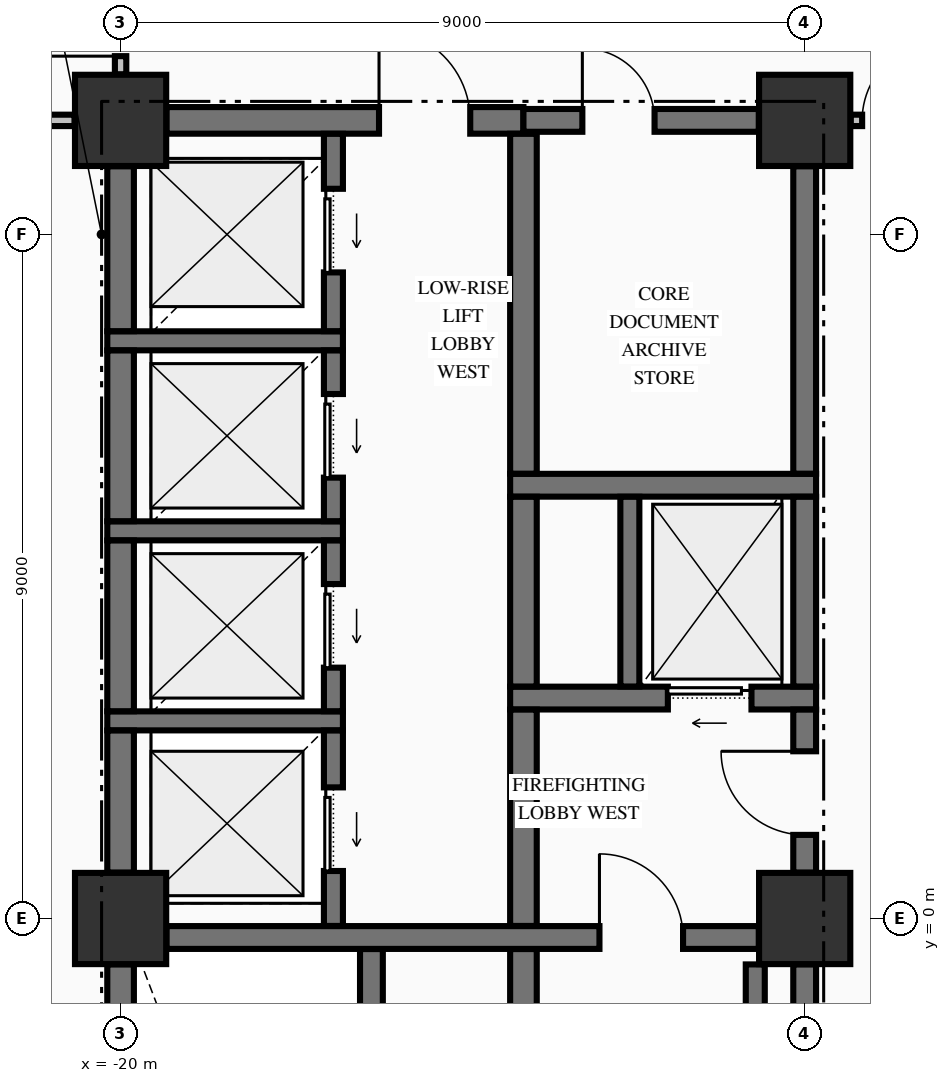
"""IFC4 building model, lengths in metres.
Left out: names, types, materials, properties, quantities, classifications, styles, units other than length and angle.
Written with IfcOpenShell. Run it as: python <this file> out.ifc"""

import sys

from ifc_helpers import new_model, si_unit, direction, frame, frame_2d, origin, origin_2d, place, context, subcontext, project, spatial, rectangle, extrude, element, fill, save


model = new_model("IFC4")
c1 = context("Model", 3, precision=1e-05, world=origin(), true_north=direction((0.0, 1.0)))
c2 = subcontext(c1, "Body", "Model", "MODEL_VIEW")
j1 = project(units=[si_unit("LENGTHUNIT", "METRE"), si_unit("PLANEANGLEUNIT", "RADIAN")], contexts=[c1])
p1 = place(None, origin())
s1 = spatial("IfcSite", under=j1, at=p1, CompositionType="ELEMENT")
p2 = place(p1, origin())
s2 = spatial("IfcBuilding", under=s1, at=p2, CompositionType="ELEMENT")
p3 = place(p2, frame((0.0, 0.0, 52.19)))
s3 = spatial("IfcBuildingStorey", under=s2, at=p3, CompositionType="ELEMENT", Elevation=52.19)
for number, where, z_axis, x_axis in (
    (1, (-20.0, 10.5, -0.425), (0.0, 0.0, 1.0), (1.0, 0.0, 0.0)),
    (2, (-11.0, 0.0, -0.425), (0.0, 0.0, 1.0), (1.0, 0.0, 0.0)),
    (3, (-11.0, 10.5, -0.425), (0.0, 0.0, 1.0), (1.0, 0.0, 0.0)),
    (4, (-20.0, 0.0, -0.425), (0.0, 0.0, 1.0), (1.0, 0.0, 0.0)),
):
    element("IfcColumn", number, at=place(p3, frame(where, z_axis=z_axis, x_axis=x_axis)), inside=s3, PredefinedType="COLUMN", context=c2, shape_type="SweptSolid", body=[
        extrude(rectangle(XDim=1.2, YDim=1.2, at=origin_2d()), origin(), (0.0, 0.0, 1.0), 5.0),
    ])
p4 = place(p3, frame((-19.396, -0.25, 0.0), z_axis=(0.0, 0.0, 1.0), x_axis=(1.0, 0.0, 0.0)))
e5 = element("IfcWall", 5, at=p4, inside=s3, PredefinedType="SHEAR", context=c2, shape_type="SweptSolid", body=[
    extrude(rectangle(XDim=7.792, YDim=0.3, at=frame_2d((3.896, 0.0))), origin(), (0.0, 0.0, 1.0), 4.575),
])
p5 = place(p4, frame((5.696, 0.0, 0.0)))
e6 = element("IfcOpeningElement", 6, at=p5, cuts=e5, PredefinedType="OPENING", context=c2, shape_type="SweptSolid", body=[
    extrude(rectangle(XDim=1.1, YDim=2.15, at=frame_2d((0.55, 1.075))), frame((0.0, 0.16, 0.0), z_axis=(0.0, -1.0, 0.0), x_axis=(1.0, 0.0, 0.0)), (0.0, 0.0, 1.0), 0.32),
])
p6 = place(p3, frame((-20.175, 2.6, 0.0), z_axis=(0.0, 0.0, 1.0), x_axis=(1.0, 0.0, 0.0)))
e7 = element("IfcWall", 7, at=p6, inside=s3, PredefinedType="SOLIDWALL", context=c2, shape_type="SweptSolid", body=[
    extrude(rectangle(XDim=3.1, YDim=0.25, at=frame_2d((1.55, 0.0))), origin(), (0.0, 0.0, 1.0), 4.575),
])
p7 = place(p3, frame((-14.875, 2.9, 0.0), z_axis=(0.0, 0.0, 1.0), x_axis=(1.0, 0.0, 0.0)))
e8 = element("IfcWall", 8, at=p7, inside=s3, PredefinedType="SHEAR", context=c2, shape_type="SweptSolid", body=[
    extrude(rectangle(XDim=4.025, YDim=0.3, at=frame_2d((2.012, 0.0))), origin(), (0.0, 0.0, 1.0), 4.575),
])
p8 = place(p7, frame((2.075, 0.0, 0.0)))
e9 = element("IfcOpeningElement", 9, at=p8, cuts=e8, PredefinedType="OPENING", context=c2, shape_type="SweptSolid", body=[
    extrude(rectangle(XDim=1.1, YDim=2.2, at=frame_2d((0.55, 1.1))), frame((0.0, 0.16, 0.0), z_axis=(0.0, -1.0, 0.0), x_axis=(1.0, 0.0, 0.0)), (0.0, 0.0, 1.0), 0.32),
])
p9 = place(p3, frame((-20.175, 5.1, 0.0), z_axis=(0.0, 0.0, 1.0), x_axis=(1.0, 0.0, 0.0)))
e10 = element("IfcWall", 10, at=p9, inside=s3, PredefinedType="SOLIDWALL", context=c2, shape_type="SweptSolid", body=[
    extrude(rectangle(XDim=3.1, YDim=0.25, at=frame_2d((1.55, 0.0))), origin(), (0.0, 0.0, 1.0), 4.575),
])
p10 = place(p3, frame((-14.875, 5.7, 0.0), z_axis=(0.0, 0.0, 1.0), x_axis=(1.0, 0.0, 0.0)))
e11 = element("IfcWall", 11, at=p10, inside=s3, PredefinedType="SHEAR", context=c2, shape_type="SweptSolid", body=[
    extrude(rectangle(XDim=4.025, YDim=0.3, at=frame_2d((2.012, 0.0))), origin(), (0.0, 0.0, 1.0), 4.575),
])
p11 = place(p3, frame((-20.175, 7.6, 0.0), z_axis=(0.0, 0.0, 1.0), x_axis=(1.0, 0.0, 0.0)))
e12 = element("IfcWall", 12, at=p11, inside=s3, PredefinedType="SOLIDWALL", context=c2, shape_type="SweptSolid", body=[
    extrude(rectangle(XDim=3.1, YDim=0.25, at=frame_2d((1.55, 0.0))), origin(), (0.0, 0.0, 1.0), 4.575),
])
p12 = place(p3, frame((-19.396, 10.5, 0.0), z_axis=(0.0, 0.0, 1.0), x_axis=(1.0, 0.0, 0.0)))
e13 = element("IfcWall", 13, at=p12, inside=s3, PredefinedType="SHEAR", context=c2, shape_type="SweptSolid", body=[
    extrude(rectangle(XDim=4.696, YDim=0.35, at=frame_2d((2.348, 0.0))), origin(), (0.0, 0.0, 1.0), 4.575),
])
p13 = place(p12, frame((2.796, 0.0, 0.0)))
e14 = element("IfcOpeningElement", 14, at=p13, cuts=e13, PredefinedType="OPENING", context=c2, shape_type="SweptSolid", body=[
    extrude(rectangle(XDim=1.2, YDim=2.15, at=frame_2d((0.6, 1.075))), frame((0.0, 0.185, 0.0), z_axis=(0.0, -1.0, 0.0), x_axis=(1.0, 0.0, 0.0)), (0.0, 0.0, 1.0), 0.37),
])
p14 = place(p3, frame((-14.7, 10.5, 0.0), z_axis=(0.0, 0.0, 1.0), x_axis=(1.0, 0.0, 0.0)))
e15 = element("IfcWall", 15, at=p14, inside=s3, PredefinedType="SHEAR", context=c2, shape_type="SweptSolid", body=[
    extrude(rectangle(XDim=3.096, YDim=0.3, at=frame_2d((1.548, 0.0))), origin(), (0.0, 0.0, 1.0), 4.575),
])
p15 = place(p14, frame((0.775, 0.0, 0.0)))
e16 = element("IfcOpeningElement", 16, at=p15, cuts=e15, PredefinedType="OPENING", context=c2, shape_type="SweptSolid", body=[
    extrude(rectangle(XDim=0.95, YDim=2.15, at=frame_2d((0.475, 1.075))), frame((0.0, 0.16, 0.0), z_axis=(0.0, -1.0, 0.0), x_axis=(1.0, 0.0, 0.0)), (0.0, 0.0, 1.0), 0.32),
])
p16 = place(p3, frame((-23.835, 10.5, 0.0), z_axis=(0.0, 0.0, 1.0), x_axis=(1.0, 0.0, 0.0)))
e17 = element("IfcWall", 17, at=p16, inside=s3, PredefinedType="PARTITIONING", context=c2, shape_type="SweptSolid", body=[
    extrude(rectangle(XDim=3.229, YDim=0.15, at=frame_2d((1.615, 0.0))), origin(), (0.0, 0.0, 1.0), 4.575),
])
p17 = place(p16, frame((1.335, 0.0, 0.0)))
e18 = element("IfcOpeningElement", 18, at=p17, cuts=e17, PredefinedType="OPENING", context=c2, shape_type="SweptSolid", body=[
    extrude(rectangle(XDim=1.0, YDim=2.15, at=frame_2d((0.5, 1.075))), frame((0.0, 0.085, 0.0), z_axis=(0.0, -1.0, 0.0), x_axis=(1.0, 0.0, 0.0)), (0.0, 0.0, 1.0), 0.17),
])
p18 = place(p3, frame((-10.394, 10.5, 0.0), z_axis=(0.0, 0.0, 1.0), x_axis=(1.0, 0.0, 0.0)))
e19 = element("IfcWall", 19, at=p18, inside=s3, PredefinedType="PARTITIONING", context=c2, shape_type="SweptSolid", body=[
    extrude(rectangle(XDim=20.788, YDim=0.15, at=frame_2d((10.394, 0.0))), origin(), (0.0, 0.0, 1.0), 4.575),
])
p19 = place(p18, frame((0.15, 0.0, 0.0)))
e20 = element("IfcOpeningElement", 20, at=p19, cuts=e19, PredefinedType="OPENING", context=c2, shape_type="SweptSolid", body=[
    extrude(rectangle(XDim=1.05, YDim=2.15, at=frame_2d((0.525, 1.075))), frame((0.0, 0.085, 0.0), z_axis=(0.0, -1.0, 0.0), x_axis=(1.0, 0.0, 0.0)), (0.0, 0.0, 1.0), 0.17),
])
p20 = place(p18, frame((19.588, 0.0, 0.0)))
e21 = element("IfcOpeningElement", 21, at=p20, cuts=e19, PredefinedType="OPENING", context=c2, shape_type="SweptSolid", body=[
    extrude(rectangle(XDim=1.05, YDim=2.15, at=frame_2d((0.525, 1.075))), frame((0.0, 0.085, 0.0), z_axis=(0.0, -1.0, 0.0), x_axis=(1.0, 0.0, 0.0)), (0.0, 0.0, 1.0), 0.17),
])
p21 = place(p3, frame((-20.0, -9.346, 0.0), z_axis=(0.0, 0.0, 1.0), x_axis=(0.0, 1.0, 0.0)))
e22 = element("IfcWall", 22, at=p21, inside=s3, PredefinedType="SHEAR", context=c2, shape_type="SweptSolid", body=[
    extrude(rectangle(XDim=8.742, YDim=0.35, at=frame_2d((4.371, 0.0))), origin(), (0.0, 0.0, 1.0), 4.575),
])
p22 = place(p3, frame((-20.0, 0.604, 0.0), z_axis=(0.0, 0.0, 1.0), x_axis=(0.0, 1.0, 0.0)))
e23 = element("IfcWall", 23, at=p22, inside=s3, PredefinedType="SHEAR", context=c2, shape_type="SweptSolid", body=[
    extrude(rectangle(XDim=1.869, YDim=0.35, at=frame_2d((0.935, 0.0))), origin(), (0.0, 0.0, 1.0), 4.575),
])
for number, where, z_axis, x_axis in (
    (24, (-20.0, 2.727, 0.0), (0.0, 0.0, 1.0), (0.0, 1.0, 0.0)),
    (25, (-20.0, 5.227, 0.0), (0.0, 0.0, 1.0), (0.0, 1.0, 0.0)),
):
    element("IfcWall", number, at=place(p3, frame(where, z_axis=z_axis, x_axis=x_axis)), inside=s3, PredefinedType="SHEAR", context=c2, shape_type="SweptSolid", body=[
        extrude(rectangle(XDim=2.246, YDim=0.35, at=frame_2d((1.123, 0.0))), origin(), (0.0, 0.0, 1.0), 4.575),
    ])
p23 = place(p3, frame((-20.0, 7.727, 0.0), z_axis=(0.0, 0.0, 1.0), x_axis=(0.0, 1.0, 0.0)))
e26 = element("IfcWall", 26, at=p23, inside=s3, PredefinedType="SHEAR", context=c2, shape_type="SweptSolid", body=[
    extrude(rectangle(XDim=2.169, YDim=0.35, at=frame_2d((1.084, 0.0))), origin(), (0.0, 0.0, 1.0), 4.575),
])
p24 = place(p3, frame((-17.2, -0.098, 0.0), z_axis=(0.0, 0.0, 1.0), x_axis=(0.0, 1.0, 0.0)))
e27 = element("IfcWall", 27, at=p24, inside=s3, PredefinedType="SOLIDWALL", context=c2, shape_type="SweptSolid", body=[
    extrude(rectangle(XDim=2.571, YDim=0.25, at=frame_2d((1.285, 0.0))), origin(), (0.0, 0.0, 1.0), 4.575),
])
p25 = place(p24, frame((0.723, 0.0, 0.0)))
e28 = element("IfcOpeningElement", 28, at=p25, cuts=e27, PredefinedType="OPENING", context=c2, shape_type="SweptSolid", body=[
    extrude(rectangle(XDim=1.1, YDim=2.2, at=frame_2d((0.55, 1.1))), frame((0.0, 0.135, 0.0), z_axis=(0.0, -1.0, 0.0), x_axis=(1.0, 0.0, 0.0)), (0.0, 0.0, 1.0), 0.27),
])
p26 = place(p3, frame((-17.2, 2.727, 0.0), z_axis=(0.0, 0.0, 1.0), x_axis=(0.0, 1.0, 0.0)))
e29 = element("IfcWall", 29, at=p26, inside=s3, PredefinedType="SOLIDWALL", context=c2, shape_type="SweptSolid", body=[
    extrude(rectangle(XDim=2.246, YDim=0.25, at=frame_2d((1.123, 0.0))), origin(), (0.0, 0.0, 1.0), 4.575),
])
p27 = place(p26, frame((0.573, 0.0, 0.0)))
e30 = element("IfcOpeningElement", 30, at=p27, cuts=e29, PredefinedType="OPENING", context=c2, shape_type="SweptSolid", body=[
    extrude(rectangle(XDim=1.1, YDim=2.2, at=frame_2d((0.55, 1.1))), frame((0.0, 0.135, 0.0), z_axis=(0.0, -1.0, 0.0), x_axis=(1.0, 0.0, 0.0)), (0.0, 0.0, 1.0), 0.27),
])
p28 = place(p3, frame((-17.2, 5.227, 0.0), z_axis=(0.0, 0.0, 1.0), x_axis=(0.0, 1.0, 0.0)))
e31 = element("IfcWall", 31, at=p28, inside=s3, PredefinedType="SOLIDWALL", context=c2, shape_type="SweptSolid", body=[
    extrude(rectangle(XDim=2.246, YDim=0.25, at=frame_2d((1.123, 0.0))), origin(), (0.0, 0.0, 1.0), 4.575),
])
p29 = place(p28, frame((0.573, 0.0, 0.0)))
e32 = element("IfcOpeningElement", 32, at=p29, cuts=e31, PredefinedType="OPENING", context=c2, shape_type="SweptSolid", body=[
    extrude(rectangle(XDim=1.1, YDim=2.2, at=frame_2d((0.55, 1.1))), frame((0.0, 0.135, 0.0), z_axis=(0.0, -1.0, 0.0), x_axis=(1.0, 0.0, 0.0)), (0.0, 0.0, 1.0), 0.27),
])
p30 = place(p3, frame((-17.2, 7.727, 0.0), z_axis=(0.0, 0.0, 1.0), x_axis=(0.0, 1.0, 0.0)))
e33 = element("IfcWall", 33, at=p30, inside=s3, PredefinedType="SOLIDWALL", context=c2, shape_type="SweptSolid", body=[
    extrude(rectangle(XDim=2.596, YDim=0.25, at=frame_2d((1.298, 0.0))), origin(), (0.0, 0.0, 1.0), 4.575),
])
p31 = place(p30, frame((0.773, 0.0, 0.0)))
e34 = element("IfcOpeningElement", 34, at=p31, cuts=e33, PredefinedType="OPENING", context=c2, shape_type="SweptSolid", body=[
    extrude(rectangle(XDim=1.1, YDim=2.2, at=frame_2d((0.55, 1.1))), frame((0.0, 0.135, 0.0), z_axis=(0.0, -1.0, 0.0), x_axis=(1.0, 0.0, 0.0)), (0.0, 0.0, 1.0), 0.27),
])
p32 = place(p3, frame((-16.7, -9.773, 0.0), z_axis=(0.0, 0.0, 1.0), x_axis=(0.0, 1.0, 0.0)))
e35 = element("IfcWall", 35, at=p32, inside=s3, PredefinedType="SHEAR", context=c2, shape_type="SweptSolid", body=[
    extrude(rectangle(XDim=9.371, YDim=0.3, at=frame_2d((4.686, 0.0))), origin(), (0.0, 0.0, 1.0), 4.575),
])
p33 = place(p3, frame((-14.7, -9.773, 0.0), z_axis=(0.0, 0.0, 1.0), x_axis=(0.0, 1.0, 0.0)))
e36 = element("IfcWall", 36, at=p33, inside=s3, PredefinedType="SHEAR", context=c2, shape_type="SweptSolid", body=[
    extrude(rectangle(XDim=9.371, YDim=0.35, at=frame_2d((4.686, 0.0))), origin(), (0.0, 0.0, 1.0), 4.575),
])
p34 = place(p3, frame((-14.7, -0.098, 0.0), z_axis=(0.0, 0.0, 1.0), x_axis=(0.0, 1.0, 0.0)))
e37 = element("IfcWall", 37, at=p34, inside=s3, PredefinedType="SHEAR", context=c2, shape_type="SweptSolid", body=[
    extrude(rectangle(XDim=2.846, YDim=0.35, at=frame_2d((1.423, 0.0))), origin(), (0.0, 0.0, 1.0), 4.575),
])
p35 = place(p3, frame((-14.7, 3.052, 0.0), z_axis=(0.0, 0.0, 1.0), x_axis=(0.0, 1.0, 0.0)))
e38 = element("IfcWall", 38, at=p35, inside=s3, PredefinedType="SHEAR", context=c2, shape_type="SweptSolid", body=[
    extrude(rectangle(XDim=2.496, YDim=0.35, at=frame_2d((1.248, 0.0))), origin(), (0.0, 0.0, 1.0), 4.575),
])
p36 = place(p3, frame((-14.7, 5.852, 0.0), z_axis=(0.0, 0.0, 1.0), x_axis=(0.0, 1.0, 0.0)))
e39 = element("IfcWall", 39, at=p36, inside=s3, PredefinedType="SHEAR", context=c2, shape_type="SweptSolid", body=[
    extrude(rectangle(XDim=4.471, YDim=0.35, at=frame_2d((2.235, 0.0))), origin(), (0.0, 0.0, 1.0), 4.575),
])
p37 = place(p3, frame((-13.3, 3.052, 0.0), z_axis=(0.0, 0.0, 1.0), x_axis=(0.0, 1.0, 0.0)))
e40 = element("IfcWall", 40, at=p37, inside=s3, PredefinedType="SOLIDWALL", context=c2, shape_type="SweptSolid", body=[
    extrude(rectangle(XDim=2.496, YDim=0.25, at=frame_2d((1.248, 0.0))), origin(), (0.0, 0.0, 1.0), 4.575),
])
p38 = place(p3, frame((-11.65, -9.346, 0.0), z_axis=(0.0, 0.0, 1.0), x_axis=(0.0, 1.0, 0.0)))
e41 = element("IfcWall", 41, at=p38, inside=s3, PredefinedType="SOLIDWALL", context=c2, shape_type="SweptSolid", body=[
    extrude(rectangle(XDim=8.742, YDim=0.25, at=frame_2d((4.371, 0.0))), origin(), (0.0, 0.0, 1.0), 4.575),
])
p39 = place(p3, frame((-11.0, -9.346, 0.0), z_axis=(0.0, 0.0, 1.0), x_axis=(0.0, 1.0, 0.0)))
e42 = element("IfcWall", 42, at=p39, inside=s3, PredefinedType="SHEAR", context=c2, shape_type="SweptSolid", body=[
    extrude(rectangle(XDim=8.742, YDim=0.3, at=frame_2d((4.371, 0.0))), origin(), (0.0, 0.0, 1.0), 4.575),
])
p40 = place(p3, frame((-11.0, 0.604, 0.0), z_axis=(0.0, 0.0, 1.0), x_axis=(0.0, 1.0, 0.0)))
e43 = element("IfcWall", 43, at=p40, inside=s3, PredefinedType="SHEAR", context=c2, shape_type="SweptSolid", body=[
    extrude(rectangle(XDim=2.144, YDim=0.3, at=frame_2d((1.072, 0.0))), origin(), (0.0, 0.0, 1.0), 4.575),
])
p41 = place(p40, frame((0.496, 0.0, 0.0)))
e44 = element("IfcOpeningElement", 44, at=p41, cuts=e43, PredefinedType="OPENING", context=c2, shape_type="SweptSolid", body=[
    extrude(rectangle(XDim=1.1, YDim=2.15, at=frame_2d((0.55, 1.075))), frame((0.0, 0.16, 0.0), z_axis=(0.0, -1.0, 0.0), x_axis=(1.0, 0.0, 0.0)), (0.0, 0.0, 1.0), 0.32),
])
p42 = place(p3, frame((-11.0, 3.052, 0.0), z_axis=(0.0, 0.0, 1.0), x_axis=(0.0, 1.0, 0.0)))
e45 = element("IfcWall", 45, at=p42, inside=s3, PredefinedType="SHEAR", context=c2, shape_type="SweptSolid", body=[
    extrude(rectangle(XDim=2.496, YDim=0.3, at=frame_2d((1.248, 0.0))), origin(), (0.0, 0.0, 1.0), 4.575),
])
p43 = place(p3, frame((-11.0, 5.852, 0.0), z_axis=(0.0, 0.0, 1.0), x_axis=(0.0, 1.0, 0.0)))
e46 = element("IfcWall", 46, at=p43, inside=s3, PredefinedType="SHEAR", context=c2, shape_type="SweptSolid", body=[
    extrude(rectangle(XDim=4.044, YDim=0.3, at=frame_2d((2.022, 0.0))), origin(), (0.0, 0.0, 1.0), 4.575),
])
p44 = place(p3, frame((-20.0, 11.106, 0.0), z_axis=(0.0, 0.0, 1.0), x_axis=(0.0, 1.0, 0.0)))
e47 = element("IfcWall", 47, at=p44, inside=s3, PredefinedType="PARTITIONING", context=c2, shape_type="SweptSolid", body=[
    extrude(rectangle(XDim=1.966, YDim=0.15, at=frame_2d((0.983, 0.0))), origin(), (0.0, 0.0, 1.0), 4.575),
])
p45 = place(p44, frame((0.239, 0.0, 0.0)))
e48 = element("IfcOpeningElement", 48, at=p45, cuts=e47, PredefinedType="OPENING", context=c2, shape_type="SweptSolid", body=[
    extrude(rectangle(XDim=0.95, YDim=2.02, at=frame_2d((0.475, 1.01))), frame((0.0, 0.085, 0.0), z_axis=(0.0, -1.0, 0.0), x_axis=(1.0, 0.0, 0.0)), (0.0, 0.0, 1.0), 0.17),
])
p46 = place(p5, origin())
e49 = element("IfcDoor", 49, at=p46, inside=s3, OperationType="SINGLE_SWING_LEFT", PredefinedType="DOOR", context=c2, shape_type="SweptSolid", body=[
    extrude(rectangle(XDim=1.1, YDim=2.15, at=frame_2d((0.55, 1.075))), frame((0.0, 0.025, 0.0), z_axis=(0.0, -1.0, 0.0), x_axis=(1.0, 0.0, 0.0)), (0.0, 0.0, 1.0), 0.05),
])
fill(e6, e49)
p47 = place(p41, origin())
e50 = element("IfcDoor", 50, at=p47, inside=s3, OperationType="SINGLE_SWING_RIGHT", PredefinedType="DOOR", context=c2, shape_type="SweptSolid", body=[
    extrude(rectangle(XDim=1.1, YDim=2.15, at=frame_2d((0.55, 1.075))), frame((0.0, 0.025, 0.0), z_axis=(0.0, -1.0, 0.0), x_axis=(1.0, 0.0, 0.0)), (0.0, 0.0, 1.0), 0.05),
])
fill(e44, e50)
p48 = place(p8, origin())
e51 = element("IfcDoor", 51, at=p48, inside=s3, OperationType="SLIDING_TO_LEFT", PredefinedType="DOOR", context=c2, shape_type="SweptSolid", body=[
    extrude(rectangle(XDim=1.1, YDim=2.2, at=frame_2d((0.55, 1.1))), frame((0.0, 0.025, 0.0), z_axis=(0.0, -1.0, 0.0), x_axis=(1.0, 0.0, 0.0)), (0.0, 0.0, 1.0), 0.05),
])
fill(e9, e51)
p49 = place(p15, origin())
e52 = element("IfcDoor", 52, at=p49, inside=s3, OperationType="SINGLE_SWING_LEFT", PredefinedType="DOOR", context=c2, shape_type="SweptSolid", body=[
    extrude(rectangle(XDim=0.95, YDim=2.15, at=frame_2d((0.475, 1.075))), frame((0.0, 0.025, 0.0), z_axis=(0.0, -1.0, 0.0), x_axis=(1.0, 0.0, 0.0)), (0.0, 0.0, 1.0), 0.05),
])
fill(e16, e52)
p50 = place(p13, origin())
e53 = element("IfcDoor", 53, at=p50, inside=s3, OperationType="SINGLE_SWING_LEFT", PredefinedType="DOOR", context=c2, shape_type="SweptSolid", body=[
    extrude(rectangle(XDim=1.2, YDim=2.15, at=frame_2d((0.6, 1.075))), frame((0.0, 0.025, 0.0), z_axis=(0.0, -1.0, 0.0), x_axis=(1.0, 0.0, 0.0)), (0.0, 0.0, 1.0), 0.05),
])
fill(e14, e53)
p51 = place(p25, origin())
e54 = element("IfcDoor", 54, at=p51, inside=s3, OperationType="SLIDING_TO_LEFT", PredefinedType="DOOR", context=c2, shape_type="SweptSolid", body=[
    extrude(rectangle(XDim=1.1, YDim=2.2, at=frame_2d((0.55, 1.1))), frame((0.0, 0.025, 0.0), z_axis=(0.0, -1.0, 0.0), x_axis=(1.0, 0.0, 0.0)), (0.0, 0.0, 1.0), 0.05),
])
fill(e28, e54)
p52 = place(p27, origin())
e55 = element("IfcDoor", 55, at=p52, inside=s3, OperationType="SLIDING_TO_LEFT", PredefinedType="DOOR", context=c2, shape_type="SweptSolid", body=[
    extrude(rectangle(XDim=1.1, YDim=2.2, at=frame_2d((0.55, 1.1))), frame((0.0, 0.025, 0.0), z_axis=(0.0, -1.0, 0.0), x_axis=(1.0, 0.0, 0.0)), (0.0, 0.0, 1.0), 0.05),
])
fill(e30, e55)
p53 = place(p29, origin())
e56 = element("IfcDoor", 56, at=p53, inside=s3, OperationType="SLIDING_TO_LEFT", PredefinedType="DOOR", context=c2, shape_type="SweptSolid", body=[
    extrude(rectangle(XDim=1.1, YDim=2.2, at=frame_2d((0.55, 1.1))), frame((0.0, 0.025, 0.0), z_axis=(0.0, -1.0, 0.0), x_axis=(1.0, 0.0, 0.0)), (0.0, 0.0, 1.0), 0.05),
])
fill(e32, e56)
p54 = place(p31, origin())
e57 = element("IfcDoor", 57, at=p54, inside=s3, OperationType="SLIDING_TO_LEFT", PredefinedType="DOOR", context=c2, shape_type="SweptSolid", body=[
    extrude(rectangle(XDim=1.1, YDim=2.2, at=frame_2d((0.55, 1.1))), frame((0.0, 0.025, 0.0), z_axis=(0.0, -1.0, 0.0), x_axis=(1.0, 0.0, 0.0)), (0.0, 0.0, 1.0), 0.05),
])
fill(e34, e57)
p55 = place(p19, origin())
e58 = element("IfcDoor", 58, at=p55, inside=s3, OperationType="SINGLE_SWING_RIGHT", PredefinedType="DOOR", context=c2, shape_type="SweptSolid", body=[
    extrude(rectangle(XDim=1.05, YDim=2.15, at=frame_2d((0.525, 1.075))), frame((0.0, 0.025, 0.0), z_axis=(0.0, -1.0, 0.0), x_axis=(1.0, 0.0, 0.0)), (0.0, 0.0, 1.0), 0.05),
])
fill(e20, e58)
p56 = place(p45, origin())
e59 = element("IfcDoor", 59, at=p56, inside=s3, OperationType="SINGLE_SWING_LEFT", PredefinedType="DOOR", context=c2, shape_type="SweptSolid", body=[
    extrude(rectangle(XDim=0.95, YDim=2.02, at=frame_2d((0.475, 1.01))), frame((0.0, 0.025, 0.0), z_axis=(0.0, -1.0, 0.0), x_axis=(1.0, 0.0, 0.0)), (0.0, 0.0, 1.0), 0.05),
])
fill(e48, e59)
save(model, sys.argv[1])
